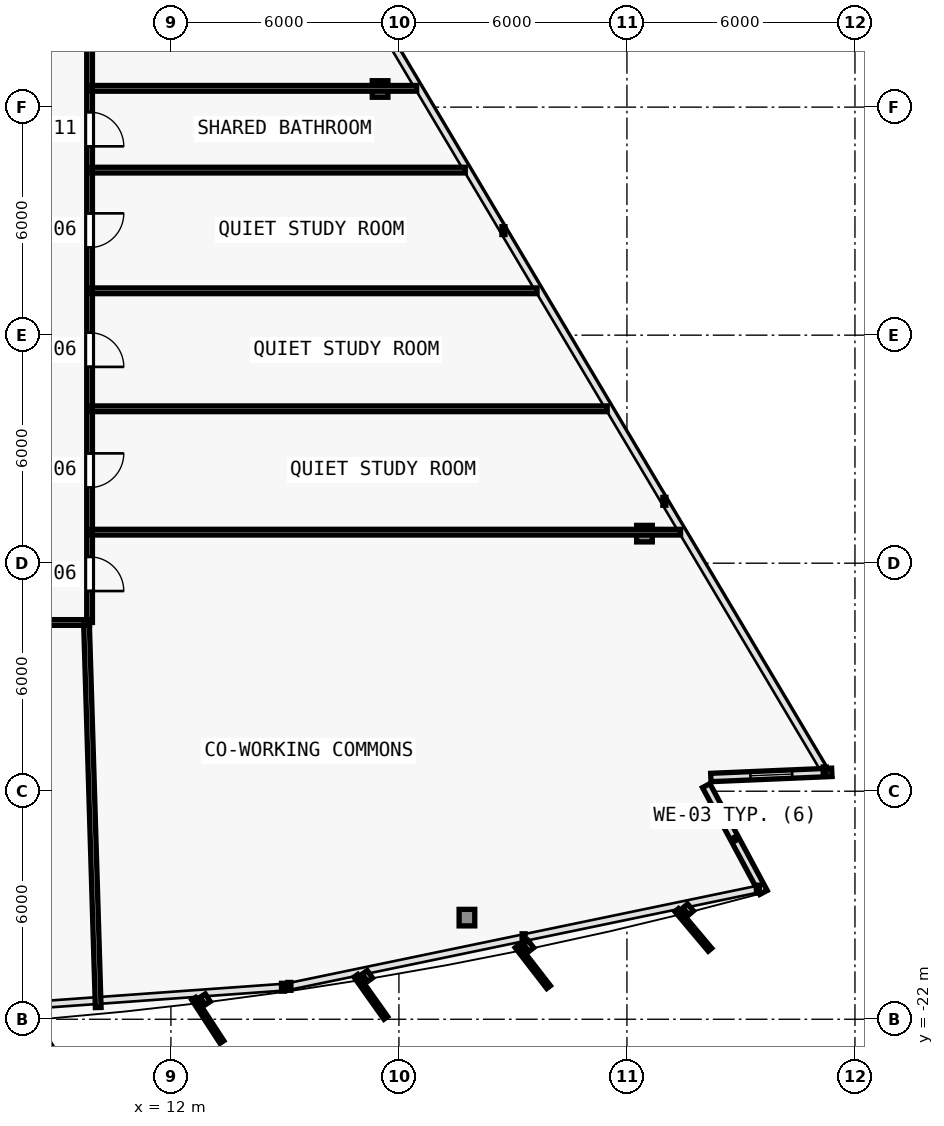
"""IFC4 building model, lengths in metres.
Left out: names, types, materials, properties, quantities, classifications, styles, units other than length and angle.
Written with IfcOpenShell. Run it as: python <this file> out.ifc"""

import sys

from ifc_helpers import new_model, si_unit, direction, frame, frame_2d, origin, origin_2d, place, context, subcontext, project, spatial, rectangle, i_section, extrude, element, fill, save


model = new_model("IFC4")
c1 = context("Model", 3, precision=1e-05, world=origin(), true_north=direction((0.0, 1.0)))
c2 = subcontext(c1, "Body", "Model", "MODEL_VIEW")
j1 = project(units=[si_unit("LENGTHUNIT", "METRE"), si_unit("PLANEANGLEUNIT", "RADIAN")], contexts=[c1])
p1 = place(None, origin())
s1 = spatial("IfcSite", under=j1, at=p1, CompositionType="ELEMENT")
p2 = place(p1, origin())
s2 = spatial("IfcBuilding", under=s1, at=p2, CompositionType="ELEMENT")
p3 = place(p2, frame((0.0, 0.0, 55.2)))
s3 = spatial("IfcBuildingStorey", under=s2, at=p3, CompositionType="ELEMENT", Elevation=55.2)
p4 = place(p3, frame((19.79, -19.326, 0.006), z_axis=(-0.020596292833, 0.033511459955, 0.999226087917), x_axis=(-0.851954850327, -0.523615252838, 0.0)))
e1 = element("IfcColumn", 1, at=p4, inside=s3, PredefinedType="COLUMN", context=c2, shape_type="SweptSolid", body=[
    extrude(i_section(OverallWidth=0.412, OverallDepth=0.435, WebThickness=0.023, FlangeThickness=0.037, FilletRadius=0.015, at=origin_2d()), origin(), (0.0, 0.0, 1.0), 3.592),
])
p5 = place(p3, frame((24.461, -9.222, 0.006), z_axis=(-0.026107436898, 0.021620221181, 0.999425318758), x_axis=(-0.637813971185, -0.770190455771, 0.0)))
e2 = element("IfcColumn", 2, at=p5, inside=s3, PredefinedType="COLUMN", context=c2, shape_type="SweptSolid", body=[
    extrude(i_section(OverallWidth=0.412, OverallDepth=0.435, WebThickness=0.023, FlangeThickness=0.037, FilletRadius=0.015, at=origin_2d()), origin(), (0.0, 0.0, 1.0), 3.591),
])
p6 = place(p3, frame((17.504, 2.477, 0.006), z_axis=(-0.018907314261, 0.009589680974, 0.999775250487), x_axis=(-0.452339157861, -0.891845999187, 0.0)))
e3 = element("IfcColumn", 3, at=p6, inside=s3, PredefinedType="COLUMN", context=c2, shape_type="SweptSolid", body=[
    extrude(i_section(OverallWidth=0.412, OverallDepth=0.435, WebThickness=0.023, FlangeThickness=0.037, FilletRadius=0.015, at=origin_2d()), origin(), (0.0, 0.0, 1.0), 3.59),
])
p7 = place(p3, frame((26.086, -15.852, 0.0), z_axis=(0.0, 0.0, 1.0), x_axis=(0.472775670204, -0.881182821929, 0.0)))
e4 = element("IfcWall", 4, at=p7, inside=s3, PredefinedType="SOLIDWALL", context=c2, shape_type="SweptSolid", body=[
    extrude(rectangle(XDim=3.19, YDim=0.22, at=frame_2d((1.595, 0.0))), origin(), (0.0, 0.0, 1.0), 3.35),
])
p8 = place(p3, frame((29.391, -15.503, 0.0), z_axis=(0.0, 0.0, 1.0), x_axis=(-0.999095632957, -0.042519597906, 0.0)))
e5 = element("IfcWall", 5, at=p8, inside=s3, PredefinedType="SOLIDWALL", context=c2, shape_type="SweptSolid", body=[
    extrude(rectangle(XDim=3.187, YDim=0.22, at=frame_2d((1.593, 0.0))), origin(), (0.0, 0.0, 1.0), 3.35),
])
p9 = place(p8, frame((1.043, 0.0, 0.62)))
e6 = element("IfcOpeningElement", 6, at=p9, cuts=e5, PredefinedType="OPENING", context=c2, shape_type="SweptSolid", body=[
    extrude(rectangle(XDim=1.1, YDim=1.8, at=frame_2d((0.55, 0.9))), frame((0.0, 0.12, 0.0), z_axis=(0.0, -1.0, 0.0), x_axis=(1.0, 0.0, 0.0)), (0.0, 0.0, 1.0), 0.24),
])
p10 = place(p3, frame((9.86, 8.426, 0.0), z_axis=(0.0, 0.0, 1.0), x_axis=(0.0, -1.0, 0.0)))
e7 = element("IfcWall", 7, at=p10, inside=s3, PredefinedType="PARTITIONING", context=c2, shape_type="SweptSolid", body=[
    extrude(rectangle(XDim=19.986, YDim=0.15, at=frame_2d((9.993, 0.0))), origin(), (0.0, 0.0, 1.0), 2.609),
])
p11 = place(p10, frame((18.258, 0.0, 0.0)))
e8 = element("IfcOpeningElement", 8, at=p11, cuts=e7, PredefinedType="OPENING", context=c2, shape_type="SweptSolid", body=[
    extrude(rectangle(XDim=0.9, YDim=2.1, at=frame_2d((0.45, 1.05))), frame((0.0, 0.085, 0.0), z_axis=(0.0, -1.0, 0.0), x_axis=(1.0, 0.0, 0.0)), (0.0, 0.0, 1.0), 0.17),
])
p12 = place(p10, frame((15.536, 0.0, 0.0)))
e9 = element("IfcOpeningElement", 9, at=p12, cuts=e7, PredefinedType="OPENING", context=c2, shape_type="SweptSolid", body=[
    extrude(rectangle(XDim=0.9, YDim=2.1, at=frame_2d((0.45, 1.05))), frame((0.0, 0.085, 0.0), z_axis=(0.0, -1.0, 0.0), x_axis=(1.0, 0.0, 0.0)), (0.0, 0.0, 1.0), 0.17),
])
p13 = place(p10, frame((12.361, 0.0, 0.0)))
e10 = element("IfcOpeningElement", 10, at=p13, cuts=e7, PredefinedType="OPENING", context=c2, shape_type="SweptSolid", body=[
    extrude(rectangle(XDim=0.9, YDim=2.1, at=frame_2d((0.45, 1.05))), frame((0.0, 0.085, 0.0), z_axis=(0.0, -1.0, 0.0), x_axis=(1.0, 0.0, 0.0)), (0.0, 0.0, 1.0), 0.17),
])
p14 = place(p10, frame((9.221, 0.0, 0.0)))
e11 = element("IfcOpeningElement", 11, at=p14, cuts=e7, PredefinedType="OPENING", context=c2, shape_type="SweptSolid", body=[
    extrude(rectangle(XDim=0.9, YDim=2.1, at=frame_2d((0.45, 1.05))), frame((0.0, 0.085, 0.0), z_axis=(0.0, -1.0, 0.0), x_axis=(1.0, 0.0, 0.0)), (0.0, 0.0, 1.0), 0.17),
])
p15 = place(p10, frame((6.557, 0.0, 0.0)))
e12 = element("IfcOpeningElement", 12, at=p15, cuts=e7, PredefinedType="OPENING", context=c2, shape_type="SweptSolid", body=[
    extrude(rectangle(XDim=0.9, YDim=2.1, at=frame_2d((0.45, 1.05))), frame((0.0, 0.085, 0.0), z_axis=(0.0, -1.0, 0.0), x_axis=(1.0, 0.0, 0.0)), (0.0, 0.0, 1.0), 0.17),
])
p16 = place(p10, frame((3.946, 0.0, 0.0)))
e13 = element("IfcOpeningElement", 13, at=p16, cuts=e7, PredefinedType="OPENING", context=c2, shape_type="SweptSolid", body=[
    extrude(rectangle(XDim=0.9, YDim=2.1, at=frame_2d((0.45, 1.05))), frame((0.0, 0.085, 0.0), z_axis=(0.0, -1.0, 0.0), x_axis=(1.0, 0.0, 0.0)), (0.0, 0.0, 1.0), 0.17),
])
p17 = place(p10, frame((1.069, 0.0, 0.0)))
e14 = element("IfcOpeningElement", 14, at=p17, cuts=e7, PredefinedType="OPENING", context=c2, shape_type="SweptSolid", body=[
    extrude(rectangle(XDim=0.9, YDim=2.1, at=frame_2d((0.45, 1.05))), frame((0.0, 0.085, 0.0), z_axis=(0.0, -1.0, 0.0), x_axis=(1.0, 0.0, 0.0)), (0.0, 0.0, 1.0), 0.17),
])
p18 = place(p3, frame((9.86, -11.56, 0.0), z_axis=(0.0, 0.0, 1.0), x_axis=(-1.0, 0.0, 0.0)))
e15 = element("IfcWall", 15, at=p18, inside=s3, PredefinedType="PARTITIONING", context=c2, shape_type="SweptSolid", body=[
    extrude(rectangle(XDim=6.78, YDim=0.15, at=frame_2d((3.39, 0.0))), origin(), (0.0, 0.0, 1.0), 3.35),
])
p19 = place(p18, frame((2.94, 0.0, 0.0)))
e16 = element("IfcOpeningElement", 16, at=p19, cuts=e15, PredefinedType="OPENING", context=c2, shape_type="SweptSolid", body=[
    extrude(rectangle(XDim=0.9, YDim=2.1, at=frame_2d((0.45, 1.05))), frame((0.0, 0.085, 0.0), z_axis=(0.0, -1.0, 0.0), x_axis=(1.0, 0.0, 0.0)), (0.0, 0.0, 1.0), 0.17),
])
p20 = place(p3, frame((9.92, -9.184, 0.0), z_axis=(0.0, 0.0, 1.0), x_axis=(1.0, 0.0, 0.0)))
e17 = element("IfcWall", 17, at=p20, inside=s3, PredefinedType="PARTITIONING", context=c2, shape_type="SweptSolid", body=[
    extrude(rectangle(XDim=15.49, YDim=0.15, at=frame_2d((7.745, 0.0))), origin(), (0.0, 0.0, 1.0), 2.609),
])
p21 = place(p3, frame((9.92, 2.494, 0.0), z_axis=(0.0, 0.0, 1.0), x_axis=(1.0, 0.0, 0.0)))
e18 = element("IfcWall", 18, at=p21, inside=s3, PredefinedType="PARTITIONING", context=c2, shape_type="SweptSolid", body=[
    extrude(rectangle(XDim=8.546, YDim=0.15, at=frame_2d((4.273, 0.0))), origin(), (0.0, 0.0, 1.0), 2.735),
])
p22 = place(p3, frame((9.92, -2.833, 0.0), z_axis=(0.0, 0.0, 1.0), x_axis=(1.0, 0.0, 0.0)))
e19 = element("IfcWall", 19, at=p22, inside=s3, PredefinedType="PARTITIONING", context=c2, shape_type="SweptSolid", body=[
    extrude(rectangle(XDim=11.714, YDim=0.15, at=frame_2d((5.857, 0.0))), origin(), (0.0, 0.0, 1.0), 2.735),
])
p23 = place(p3, frame((9.78, -11.62, 0.0), z_axis=(0.0, 0.0, 1.0), x_axis=(0.030506267256, -0.999534575519, 0.0)))
e20 = element("IfcWall", 20, at=p23, inside=s3, PredefinedType="PARTITIONING", context=c2, shape_type="SweptSolid", body=[
    extrude(rectangle(XDim=10.076, YDim=0.15, at=frame_2d((5.038, 0.0))), origin(), (0.0, 0.0, 1.0), 2.725),
])
p24 = place(p3, frame((9.92, -5.937, 0.0), z_axis=(0.0, 0.0, 1.0), x_axis=(1.0, 0.0, 0.0)))
e21 = element("IfcWall", 21, at=p24, inside=s3, PredefinedType="PARTITIONING", context=c2, shape_type="SweptSolid", body=[
    extrude(rectangle(XDim=13.56, YDim=0.15, at=frame_2d((6.78, 0.0))), origin(), (0.0, 0.0, 1.0), 2.735),
])
p25 = place(p3, frame((9.92, 0.343, 0.0), z_axis=(0.0, 0.0, 1.0), x_axis=(1.0, 0.0, 0.0)))
e22 = element("IfcWall", 22, at=p25, inside=s3, PredefinedType="PARTITIONING", context=c2, shape_type="SweptSolid", body=[
    extrude(rectangle(XDim=9.826, YDim=0.15, at=frame_2d((4.913, 0.0))), origin(), (0.0, 0.0, 1.0), 2.735),
])
p26 = place(p9, origin())
e23 = element("IfcWindow", 23, at=p26, inside=s3, PartitioningType="SINGLE_PANEL", PredefinedType="WINDOW", context=c2, shape_type="SweptSolid", body=[
    extrude(rectangle(XDim=1.1, YDim=1.8, at=frame_2d((0.55, 0.9))), frame((0.0, 0.03, 0.0), z_axis=(0.0, -1.0, 0.0), x_axis=(1.0, 0.0, 0.0)), (0.0, 0.0, 1.0), 0.06),
])
fill(e6, e23)
p27 = place(p11, origin())
e24 = element("IfcDoor", 24, at=p27, inside=s3, OperationType="SINGLE_SWING_RIGHT", PredefinedType="DOOR", context=c2, shape_type="SweptSolid", body=[
    extrude(rectangle(XDim=0.9, YDim=2.1, at=frame_2d((0.45, 1.05))), frame((0.0, 0.025, 0.0), z_axis=(0.0, -1.0, 0.0), x_axis=(1.0, 0.0, 0.0)), (0.0, 0.0, 1.0), 0.05),
])
fill(e8, e24)
p28 = place(p12, origin())
e25 = element("IfcDoor", 25, at=p28, inside=s3, OperationType="SINGLE_SWING_LEFT", PredefinedType="DOOR", context=c2, shape_type="SweptSolid", body=[
    extrude(rectangle(XDim=0.9, YDim=2.1, at=frame_2d((0.45, 1.05))), frame((0.0, 0.025, 0.0), z_axis=(0.0, -1.0, 0.0), x_axis=(1.0, 0.0, 0.0)), (0.0, 0.0, 1.0), 0.05),
])
fill(e9, e25)
p29 = place(p13, origin())
e26 = element("IfcDoor", 26, at=p29, inside=s3, OperationType="SINGLE_SWING_RIGHT", PredefinedType="DOOR", context=c2, shape_type="SweptSolid", body=[
    extrude(rectangle(XDim=0.9, YDim=2.1, at=frame_2d((0.45, 1.05))), frame((0.0, 0.025, 0.0), z_axis=(0.0, -1.0, 0.0), x_axis=(1.0, 0.0, 0.0)), (0.0, 0.0, 1.0), 0.05),
])
fill(e10, e26)
p30 = place(p14, origin())
e27 = element("IfcDoor", 27, at=p30, inside=s3, OperationType="SINGLE_SWING_LEFT", PredefinedType="DOOR", context=c2, shape_type="SweptSolid", body=[
    extrude(rectangle(XDim=0.9, YDim=2.1, at=frame_2d((0.45, 1.05))), frame((0.0, 0.025, 0.0), z_axis=(0.0, -1.0, 0.0), x_axis=(1.0, 0.0, 0.0)), (0.0, 0.0, 1.0), 0.05),
])
fill(e11, e27)
p31 = place(p15, origin())
e28 = element("IfcDoor", 28, at=p31, inside=s3, OperationType="SINGLE_SWING_RIGHT", PredefinedType="DOOR", context=c2, shape_type="SweptSolid", body=[
    extrude(rectangle(XDim=0.9, YDim=2.1, at=frame_2d((0.45, 1.05))), frame((0.0, 0.025, 0.0), z_axis=(0.0, -1.0, 0.0), x_axis=(1.0, 0.0, 0.0)), (0.0, 0.0, 1.0), 0.05),
])
fill(e12, e28)
save(model, sys.argv[1])
